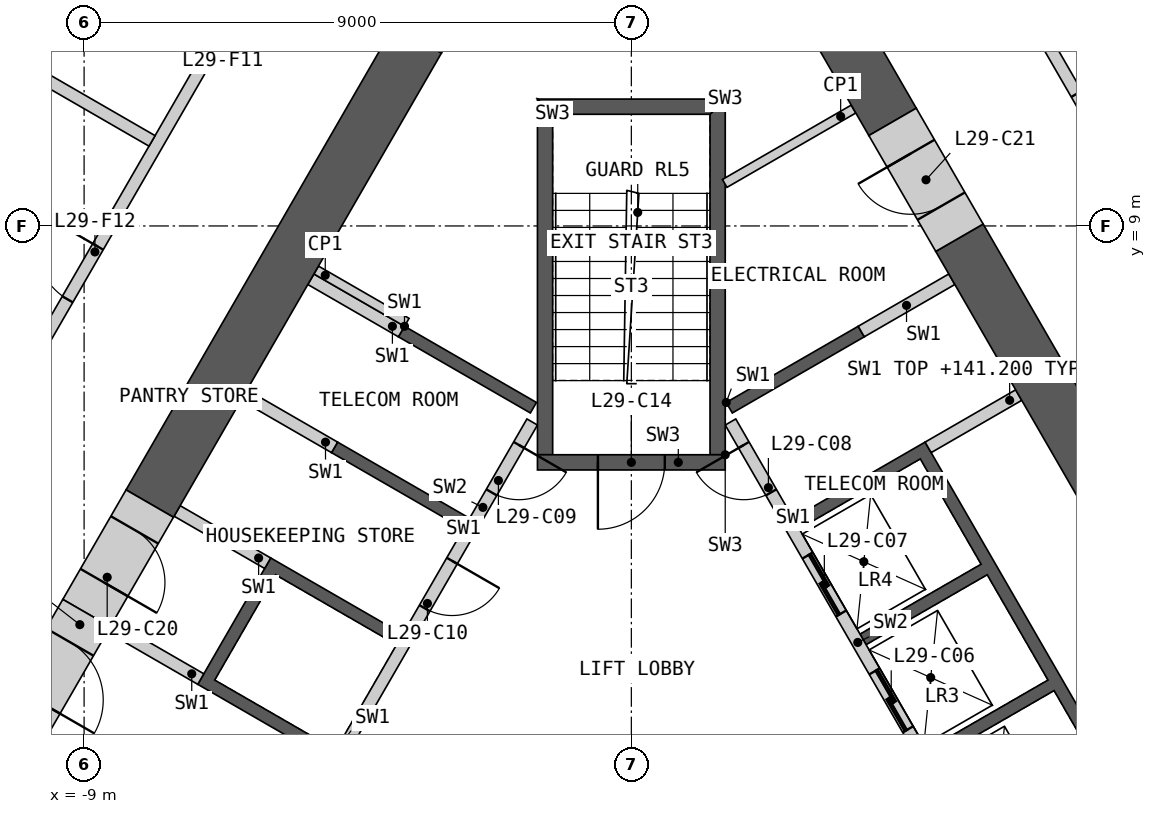
"""IFC4 building model, lengths in metres.
Left out: names, types, materials, properties, quantities, classifications, styles, units other than length and angle.
Written with IfcOpenShell. Run it as: python <this file> out.ifc"""

import sys

from ifc_helpers import new_model, si_unit, direction, frame, frame_2d, origin, place, context, subcontext, project, spatial, polyline, rectangle, outline, extrude, element, fill, save


model = new_model("IFC4")
c1 = context("Model", 3, precision=1e-05, world=origin(), true_north=direction((0.0, 1.0)))
c2 = subcontext(c1, "Body", "Model", "MODEL_VIEW")
j1 = project(units=[si_unit("LENGTHUNIT", "METRE"), si_unit("PLANEANGLEUNIT", "RADIAN")], contexts=[c1])
p1 = place(None, origin())
s1 = spatial("IfcSite", under=j1, at=p1, CompositionType="ELEMENT")
p2 = place(p1, origin())
s2 = spatial("IfcBuilding", under=s1, at=p2, CompositionType="ELEMENT")
p3 = place(p2, frame((0.0, 0.0, 137.4)))
s3 = spatial("IfcBuildingStorey", under=s2, at=p3, CompositionType="ELEMENT", Elevation=137.4)
p4 = place(p3, origin())
e1 = element("IfcWall", 1, at=p4, inside=s3, PredefinedType="SHEAR", context=c2, shape_type="SweptSolid", body=[
    extrude(outline(polyline([(1.561, 6.097), (3.731, 7.35), (3.831, 7.177), (1.66, 5.924), (1.561, 6.097)])), origin(), (0.0, 0.0, 1.0), 3.8),
])
p5 = place(p3, origin())
e2 = element("IfcWall", 2, at=p5, inside=s3, PredefinedType="SHEAR", context=c2, shape_type="SweptSolid", body=[
    extrude(outline(polyline([(2.66, 4.192), (4.831, 5.445), (8.231, -0.444), (6.061, -1.697), (5.96, -1.524), (7.952, -0.374), (6.952, 1.358), (4.96, 0.208), (4.861, 0.381), (6.852, 1.531), (5.852, 3.263), (3.861, 2.113), (3.76, 2.287), (5.752, 3.437), (4.752, 5.169), (2.76, 4.019), (2.66, 4.192)])), origin(), (0.0, 0.0, 1.0), 3.8),
])
p6 = place(p3, frame((5.817, -1.476, 0.0), z_axis=(0.0, 0.0, 1.0), x_axis=(-0.500002616675, 0.866023893041, 0.0)))
e3 = element("IfcWall", 3, at=p6, inside=s3, PredefinedType="SOLIDWALL", context=c2, shape_type="SweptSolid", body=[
    extrude(rectangle(XDim=8.373, YDim=0.2, at=frame_2d((4.187, 0.0))), origin(), (0.0, 0.0, 1.0), 3.8),
])
p7 = place(p6, frame((0.337, 0.0, 0.0)))
e4 = element("IfcOpeningElement", 4, at=p7, cuts=e3, PredefinedType="OPENING", context=c2, shape_type="SweptSolid", body=[
    extrude(rectangle(XDim=1.1, YDim=2.1, at=frame_2d((0.55, 1.05))), frame((0.0, 0.11, 0.0), z_axis=(0.0, -1.0, 0.0), x_axis=(1.0, 0.0, 0.0)), (0.0, 0.0, 1.0), 0.22),
])
p8 = place(p6, frame((2.537, 0.0, 0.0)))
e5 = element("IfcOpeningElement", 5, at=p8, cuts=e3, PredefinedType="OPENING", context=c2, shape_type="SweptSolid", body=[
    extrude(rectangle(XDim=1.1, YDim=2.1, at=frame_2d((0.55, 1.05))), frame((0.0, 0.11, 0.0), z_axis=(0.0, -1.0, 0.0), x_axis=(1.0, 0.0, 0.0)), (0.0, 0.0, 1.0), 0.22),
])
p9 = place(p6, frame((4.737, 0.0, 0.0)))
e6 = element("IfcOpeningElement", 6, at=p9, cuts=e3, PredefinedType="OPENING", context=c2, shape_type="SweptSolid", body=[
    extrude(rectangle(XDim=1.1, YDim=2.1, at=frame_2d((0.55, 1.05))), frame((0.0, 0.11, 0.0), z_axis=(0.0, -1.0, 0.0), x_axis=(1.0, 0.0, 0.0)), (0.0, 0.0, 1.0), 0.22),
])
p10 = place(p6, frame((7.037, 0.0, 0.0)))
e7 = element("IfcOpeningElement", 7, at=p10, cuts=e3, PredefinedType="OPENING", context=c2, shape_type="SweptSolid", body=[
    extrude(rectangle(XDim=0.9, YDim=2.1, at=frame_2d((0.45, 1.05))), frame((0.0, 0.11, 0.0), z_axis=(0.0, -1.0, 0.0), x_axis=(1.0, 0.0, 0.0)), (0.0, 0.0, 1.0), 0.22),
])
for number, where, z_axis, x_axis in (
    (8, (4.881, 5.358, 0.0), (0.0, 0.0, 1.0), (0.866, 0.5, 0.0)),
    (9, (3.781, 7.263, 0.0), (0.0, 0.0, 1.0), (0.866, 0.5, 0.0)),
):
    element("IfcWall", number, at=place(p3, frame(where, z_axis=z_axis, x_axis=x_axis)), inside=s3, PredefinedType="SHEAR", context=c2, shape_type="SweptSolid", body=[
        extrude(rectangle(XDim=1.72, YDim=0.2, at=frame_2d((0.86, 0.0))), origin(), (0.0, 0.0, 1.0), 3.8),
    ])
p11 = place(p3, origin())
e10 = element("IfcWall", 10, at=p11, inside=s3, PredefinedType="SHEAR", context=c2, shape_type="SweptSolid", body=[
    extrude(outline(polyline([(-4.96, 0.208), (-7.131, 1.461), (-5.931, 3.54), (-3.76, 2.287), (-3.861, 2.113), (-5.852, 3.263), (-6.852, 1.531), (-4.861, 0.381), (-4.96, 0.208)])), origin(), (0.0, 0.0, 1.0), 3.8),
])
p12 = place(p3, origin())
e11 = element("IfcWall", 11, at=p12, inside=s3, PredefinedType="SHEAR", context=c2, shape_type="SweptSolid", body=[
    extrude(outline(polyline([(-2.76, 4.019), (-4.931, 5.272), (-4.831, 5.445), (-2.66, 4.192), (-2.76, 4.019)])), origin(), (0.0, 0.0, 1.0), 3.8),
])
p13 = place(p3, origin())
e12 = element("IfcWall", 12, at=p13, inside=s3, PredefinedType="SHEAR", context=c2, shape_type="SweptSolid", body=[
    extrude(outline(polyline([(-3.731, 7.35), (-1.561, 6.097), (-1.66, 5.924), (-3.831, 7.177), (-3.731, 7.35)])), origin(), (0.0, 0.0, 1.0), 3.8),
])
p14 = place(p3, frame((-1.631, 5.776, 0.0), z_axis=(0.0, 0.0, 1.0), x_axis=(-0.499992876559, -0.866029516466, 0.0)))
e13 = element("IfcWall", 13, at=p14, inside=s3, PredefinedType="SOLIDWALL", context=c2, shape_type="SweptSolid", body=[
    extrude(rectangle(XDim=6.486, YDim=0.2, at=frame_2d((3.243, 0.0))), origin(), (0.0, 0.0, 1.0), 3.8),
])
p15 = place(p14, frame((0.437, 0.0, 0.0)))
e14 = element("IfcOpeningElement", 14, at=p15, cuts=e13, PredefinedType="OPENING", context=c2, shape_type="SweptSolid", body=[
    extrude(rectangle(XDim=0.9, YDim=2.1, at=frame_2d((0.45, 1.05))), frame((0.0, 0.11, 0.0), z_axis=(0.0, -1.0, 0.0), x_axis=(1.0, 0.0, 0.0)), (0.0, 0.0, 1.0), 0.22),
])
p16 = place(p14, frame((2.637, 0.0, 0.0)))
e15 = element("IfcOpeningElement", 15, at=p16, cuts=e13, PredefinedType="OPENING", context=c2, shape_type="SweptSolid", body=[
    extrude(rectangle(XDim=0.9, YDim=2.1, at=frame_2d((0.45, 1.05))), frame((0.0, 0.11, 0.0), z_axis=(0.0, -1.0, 0.0), x_axis=(1.0, 0.0, 0.0)), (0.0, 0.0, 1.0), 0.22),
])
for number, where, z_axis, x_axis in (
    (16, (-3.781, 7.263, 0.0), (0.0, 0.0, 1.0), (-0.866, 0.5, 0.0)),
    (17, (-4.881, 5.358, 0.0), (0.0, 0.0, 1.0), (-0.866, 0.5, 0.0)),
):
    element("IfcWall", number, at=place(p3, frame(where, z_axis=z_axis, x_axis=x_axis)), inside=s3, PredefinedType="SHEAR", context=c2, shape_type="SweptSolid", body=[
        extrude(rectangle(XDim=1.72, YDim=0.2, at=frame_2d((0.86, 0.0))), origin(), (0.0, 0.0, 1.0), 3.8),
    ])
p17 = place(p3, frame((-5.981, 3.453, 0.0), z_axis=(0.0, 0.0, 1.0), x_axis=(-0.866060346521, 0.499939472521, 0.0)))
e18 = element("IfcWall", 18, at=p17, inside=s3, PredefinedType="SHEAR", context=c2, shape_type="SweptSolid", body=[
    extrude(rectangle(XDim=1.72, YDim=0.2, at=frame_2d((0.86, 0.0))), origin(), (0.0, 0.0, 1.0), 3.8),
])
p18 = place(p3, frame((-7.081, 1.548, 0.0), z_axis=(0.0, 0.0, 1.0), x_axis=(-0.865963414263, 0.500107353632, 0.0)))
e19 = element("IfcWall", 19, at=p18, inside=s3, PredefinedType="SHEAR", context=c2, shape_type="SweptSolid", body=[
    extrude(rectangle(XDim=1.72, YDim=0.2, at=frame_2d((0.86, 0.0))), origin(), (0.0, 0.0, 1.0), 3.8),
])
p19 = place(p3, origin())
e20 = element("IfcWall", 20, at=p19, inside=s3, PredefinedType="SHEAR", context=c2, shape_type="SweptSolid", body=[
    extrude(outline(polyline([(1.544, 5.237), (1.544, 11.087), (1.294, 10.837), (1.294, 5.237), (1.544, 5.237)])), origin(), (0.0, 0.0, 1.0), 3.8),
])
p20 = place(p3, origin())
e21 = element("IfcWall", 21, at=p20, inside=s3, PredefinedType="SHEAR", context=c2, shape_type="SweptSolid", body=[
    extrude(outline(polyline([(1.544, 11.087), (-1.544, 11.087), (-1.294, 10.837), (1.294, 10.837), (1.544, 11.087)])), origin(), (0.0, 0.0, 1.0), 3.8),
])
p21 = place(p3, origin())
e22 = element("IfcWall", 22, at=p21, inside=s3, PredefinedType="SHEAR", context=c2, shape_type="SweptSolid", body=[
    extrude(outline(polyline([(-1.294, 10.837), (-1.544, 11.087), (-1.544, 5.237), (-1.294, 5.237), (-1.294, 10.837)])), origin(), (0.0, 0.0, 1.0), 3.8),
])
p22 = place(p3, frame((1.544, 5.112, 0.0), z_axis=(0.0, 0.0, 1.0), x_axis=(-1.0, 0.0, 0.0)))
e23 = element("IfcWall", 23, at=p22, inside=s3, PredefinedType="SHEAR", context=c2, shape_type="SweptSolid", body=[
    extrude(rectangle(XDim=3.088, YDim=0.25, at=frame_2d((1.544, 0.0))), origin(), (0.0, 0.0, 1.0), 3.8),
])
p23 = place(p22, frame((0.994, 0.0, 0.0)))
e24 = element("IfcOpeningElement", 24, at=p23, cuts=e23, PredefinedType="OPENING", context=c2, shape_type="SweptSolid", body=[
    extrude(rectangle(XDim=1.1, YDim=2.1, at=frame_2d((0.55, 1.05))), frame((0.0, 0.135, 0.0), z_axis=(0.0, -1.0, 0.0), x_axis=(1.0, 0.0, 0.0)), (0.0, 0.0, 1.0), 0.27),
])
p24 = place(p3, frame((-3.693, 7.415, 0.0), z_axis=(0.0, 0.0, 1.0), x_axis=(-0.866024871741, 0.500000921525, 0.0)))
e25 = element("IfcWall", 25, at=p24, inside=s3, PredefinedType="PARTITIONING", context=c2, shape_type="SweptSolid", body=[
    extrude(rectangle(XDim=1.72, YDim=0.15, at=frame_2d((0.86, 0.0))), origin(), (0.0, 0.0, 1.0), 3.8),
])
p25 = place(p3, frame((3.654, 10.923, 0.0), z_axis=(0.0, 0.0, 1.0), x_axis=(-0.865974546186, -0.5000880776, 0.0)))
e26 = element("IfcWall", 26, at=p25, inside=s3, PredefinedType="PARTITIONING", context=c2, shape_type="SweptSolid", body=[
    extrude(rectangle(XDim=2.447, YDim=0.15, at=frame_2d((1.223, 0.0))), origin(), (0.0, 0.0, 1.0), 3.8),
])
p26 = place(p3, frame((10.521, -0.07, 0.0), z_axis=(0.0, 0.0, 1.0), x_axis=(-0.499997384719, 0.866026913713, 0.0)))
e27 = element("IfcWall", 27, at=p26, inside=s3, PredefinedType="SHEAR", context=c2, shape_type="SweptSolid", body=[
    extrude(rectangle(XDim=10.249, YDim=0.9, at=frame_2d((5.125, 0.0))), origin(), (0.0, 0.0, 1.0), 3.8),
])
p27 = place(p3, frame((4.296, 10.712, 0.0), z_axis=(0.0, 0.0, 1.0), x_axis=(-0.500011000363, 0.866019052629, 0.0)))
e28 = element("IfcWall", 28, at=p27, inside=s3, PredefinedType="SHEAR", context=c2, shape_type="SweptSolid", body=[
    extrude(rectangle(XDim=7.812, YDim=0.9, at=frame_2d((3.906, 0.0))), origin(), (0.0, 0.0, 1.0), 3.8),
])
p28 = place(p3, frame((-3.512, 12.069, 0.0), z_axis=(0.0, 0.0, 1.0), x_axis=(-0.500002126466, -0.866024176065, 0.0)))
e29 = element("IfcWall", 29, at=p28, inside=s3, PredefinedType="SHEAR", context=c2, shape_type="SweptSolid", body=[
    extrude(rectangle(XDim=8.816, YDim=0.9, at=frame_2d((4.408, 0.0))), origin(), (0.0, 0.0, 1.0), 3.8),
])
p29 = place(p3, frame((-7.92, 4.434, 0.0), z_axis=(0.0, 0.0, 1.0), x_axis=(-0.499939227269, -0.866060488094, 0.0)))
e30 = element("IfcWall", 30, at=p29, inside=s3, PredefinedType="SHEAR", context=c2, shape_type="SweptSolid", body=[
    extrude(rectangle(XDim=2.08, YDim=0.9, at=frame_2d((1.04, 0.0))), origin(), (0.0, 0.0, 1.0), 3.8),
])
p30 = place(p29, frame((0.5, 0.0, 0.0)))
e31 = element("IfcOpeningElement", 31, at=p30, cuts=e30, PredefinedType="OPENING", context=c2, shape_type="SweptSolid", body=[
    extrude(rectangle(XDim=1.0, YDim=2.1, at=frame_2d((0.5, 1.05))), frame((0.0, 0.46, 0.0), z_axis=(0.0, -1.0, 0.0), x_axis=(1.0, 0.0, 0.0)), (0.0, 0.0, 1.0), 0.92),
])
p31 = place(p3, frame((5.396, 8.806, 0.0), z_axis=(0.0, 0.0, 1.0), x_axis=(-0.499981787252, 0.866035918664, 0.0)))
e32 = element("IfcWall", 32, at=p31, inside=s3, PredefinedType="SHEAR", context=c2, shape_type="SweptSolid", body=[
    extrude(rectangle(XDim=2.2, YDim=0.9, at=frame_2d((1.1, 0.0))), origin(), (0.0, 0.0, 1.0), 3.8),
])
p32 = place(p31, frame((0.6, 0.0, 0.0)))
e33 = element("IfcOpeningElement", 33, at=p32, cuts=e32, PredefinedType="OPENING", context=c2, shape_type="SweptSolid", body=[
    extrude(rectangle(XDim=1.0, YDim=2.1, at=frame_2d((0.5, 1.05))), frame((0.0, 0.46, 0.0), z_axis=(0.0, -1.0, 0.0), x_axis=(1.0, 0.0, 0.0)), (0.0, 0.0, 1.0), 0.92),
])
p33 = place(p3, frame((-2.413, 13.974, 0.0), z_axis=(0.0, 0.0, 1.0), x_axis=(-0.499946605688, -0.86605622881, 0.0)))
e34 = element("IfcWall", 34, at=p33, inside=s3, PredefinedType="SHEAR", context=c2, shape_type="SweptSolid", body=[
    extrude(rectangle(XDim=2.2, YDim=0.9, at=frame_2d((1.1, 0.0))), origin(), (0.0, 0.0, 1.0), 3.8),
])
p34 = place(p33, frame((0.6, 0.0, 0.0)))
e35 = element("IfcOpeningElement", 35, at=p34, cuts=e34, PredefinedType="OPENING", context=c2, shape_type="SweptSolid", body=[
    extrude(rectangle(XDim=1.0, YDim=2.1, at=frame_2d((0.5, 1.05))), frame((0.0, 0.46, 0.0), z_axis=(0.0, -1.0, 0.0), x_axis=(1.0, 0.0, 0.0)), (0.0, 0.0, 1.0), 0.92),
])
p35 = place(p3, frame((-8.96, 2.633, 0.0), z_axis=(0.0, 0.0, 1.0), x_axis=(-0.50002983664, -0.866008176907, 0.0)))
e36 = element("IfcWall", 36, at=p35, inside=s3, PredefinedType="SHEAR", context=c2, shape_type="SweptSolid", body=[
    extrude(rectangle(XDim=2.2, YDim=0.9, at=frame_2d((1.1, 0.0))), origin(), (0.0, 0.0, 1.0), 3.8),
])
p36 = place(p35, frame((0.55, 0.0, 0.0)))
e37 = element("IfcOpeningElement", 37, at=p36, cuts=e36, PredefinedType="OPENING", context=c2, shape_type="SweptSolid", body=[
    extrude(rectangle(XDim=1.1, YDim=2.1, at=frame_2d((0.55, 1.05))), frame((0.0, 0.46, 0.0), z_axis=(0.0, -1.0, 0.0), x_axis=(1.0, 0.0, 0.0)), (0.0, 0.0, 1.0), 0.92),
])
p37 = place(p3, frame((5.295, 14.68, 0.0), z_axis=(0.0, 0.0, 1.0), x_axis=(0.500012035596, -0.866018454918, 0.0)))
e38 = element("IfcWall", 38, at=p37, inside=s3, PredefinedType="PARTITIONING", context=c2, shape_type="SweptSolid", body=[
    extrude(rectangle(XDim=9.803, YDim=0.2, at=frame_2d((4.902, 0.0))), origin(), (0.0, 0.0, 1.0), 3.8),
])
p38 = place(p37, frame((4.052, 0.0, 0.0)))
e39 = element("IfcOpeningElement", 39, at=p38, cuts=e38, PredefinedType="OPENING", context=c2, shape_type="SweptSolid", body=[
    extrude(rectangle(XDim=1.8, YDim=2.1, at=frame_2d((0.9, 1.05))), frame((0.0, 0.11, 0.0), z_axis=(0.0, -1.0, 0.0), x_axis=(1.0, 0.0, 0.0)), (0.0, 0.0, 1.0), 0.22),
])
p39 = place(p3, frame((-10.197, 6.19, 0.0), z_axis=(0.0, 0.0, 1.0), x_axis=(0.500012035596, 0.866018454918, 0.0)))
e40 = element("IfcWall", 40, at=p39, inside=s3, PredefinedType="PARTITIONING", context=c2, shape_type="SweptSolid", body=[
    extrude(rectangle(XDim=9.803, YDim=0.2, at=frame_2d((4.902, 0.0))), origin(), (0.0, 0.0, 1.0), 3.8),
])
p40 = place(p39, frame((6.853, 0.0, 0.0)))
e41 = element("IfcOpeningElement", 41, at=p40, cuts=e40, PredefinedType="OPENING", context=c2, shape_type="SweptSolid", body=[
    extrude(rectangle(XDim=1.0, YDim=2.1, at=frame_2d((0.5, 1.05))), frame((0.0, 0.11, 0.0), z_axis=(0.0, -1.0, 0.0), x_axis=(1.0, 0.0, 0.0)), (0.0, 0.0, 1.0), 0.22),
])
p41 = place(p39, frame((1.851, 0.0, 0.0)))
e42 = element("IfcOpeningElement", 42, at=p41, cuts=e40, PredefinedType="OPENING", context=c2, shape_type="SweptSolid", body=[
    extrude(rectangle(XDim=1.0, YDim=2.1, at=frame_2d((0.5, 1.05))), frame((0.0, 0.11, 0.0), z_axis=(0.0, -1.0, 0.0), x_axis=(1.0, 0.0, 0.0)), (0.0, 0.0, 1.0), 0.22),
])
p42 = place(p3, frame((-15.01, 14.514, 0.0), z_axis=(0.0, 0.0, 1.0), x_axis=(0.866018103232, -0.500012644715, 0.0)))
e43 = element("IfcWall", 43, at=p42, inside=s3, PredefinedType="PARTITIONING", context=c2, shape_type="SweptSolid", body=[
    extrude(rectangle(XDim=8.229, YDim=0.2, at=frame_2d((4.115, 0.0))), origin(), (0.0, 0.0, 1.0), 2.885),
])
p43 = place(p8, origin())
e44 = element("IfcDoor", 44, at=p43, inside=s3, OperationType="SLIDING_TO_LEFT", PredefinedType="DOOR", context=c2, shape_type="SweptSolid", body=[
    extrude(rectangle(XDim=1.1, YDim=2.1, at=frame_2d((0.55, 1.05))), frame((0.0, 0.025, 0.0), z_axis=(0.0, -1.0, 0.0), x_axis=(1.0, 0.0, 0.0)), (0.0, 0.0, 1.0), 0.05),
])
fill(e5, e44)
p44 = place(p9, origin())
e45 = element("IfcDoor", 45, at=p44, inside=s3, OperationType="SLIDING_TO_LEFT", PredefinedType="DOOR", context=c2, shape_type="SweptSolid", body=[
    extrude(rectangle(XDim=1.1, YDim=2.1, at=frame_2d((0.55, 1.05))), frame((0.0, 0.025, 0.0), z_axis=(0.0, -1.0, 0.0), x_axis=(1.0, 0.0, 0.0)), (0.0, 0.0, 1.0), 0.05),
])
fill(e6, e45)
p45 = place(p10, origin())
e46 = element("IfcDoor", 46, at=p45, inside=s3, OperationType="SINGLE_SWING_RIGHT", PredefinedType="DOOR", context=c2, shape_type="SweptSolid", body=[
    extrude(rectangle(XDim=0.9, YDim=2.1, at=frame_2d((0.45, 1.05))), frame((0.0, 0.025, 0.0), z_axis=(0.0, -1.0, 0.0), x_axis=(1.0, 0.0, 0.0)), (0.0, 0.0, 1.0), 0.05),
])
fill(e7, e46)
p46 = place(p15, origin())
e47 = element("IfcDoor", 47, at=p46, inside=s3, OperationType="SINGLE_SWING_LEFT", PredefinedType="DOOR", context=c2, shape_type="SweptSolid", body=[
    extrude(rectangle(XDim=0.9, YDim=2.1, at=frame_2d((0.45, 1.05))), frame((0.0, 0.025, 0.0), z_axis=(0.0, -1.0, 0.0), x_axis=(1.0, 0.0, 0.0)), (0.0, 0.0, 1.0), 0.05),
])
fill(e14, e47)
p47 = place(p16, origin())
e48 = element("IfcDoor", 48, at=p47, inside=s3, OperationType="SINGLE_SWING_LEFT", PredefinedType="DOOR", context=c2, shape_type="SweptSolid", body=[
    extrude(rectangle(XDim=0.9, YDim=2.1, at=frame_2d((0.45, 1.05))), frame((0.0, 0.025, 0.0), z_axis=(0.0, -1.0, 0.0), x_axis=(1.0, 0.0, 0.0)), (0.0, 0.0, 1.0), 0.05),
])
fill(e15, e48)
p48 = place(p23, origin())
e49 = element("IfcDoor", 49, at=p48, inside=s3, OperationType="SINGLE_SWING_RIGHT", PredefinedType="DOOR", context=c2, shape_type="SweptSolid", body=[
    extrude(rectangle(XDim=1.1, YDim=2.1, at=frame_2d((0.55, 1.05))), frame((0.0, 0.025, 0.0), z_axis=(0.0, -1.0, 0.0), x_axis=(1.0, 0.0, 0.0)), (0.0, 0.0, 1.0), 0.05),
])
fill(e24, e49)
p49 = place(p30, origin())
e50 = element("IfcDoor", 50, at=p49, inside=s3, OperationType="SINGLE_SWING_RIGHT", PredefinedType="DOOR", context=c2, shape_type="SweptSolid", body=[
    extrude(rectangle(XDim=1.0, YDim=2.1, at=frame_2d((0.5, 1.05))), frame((0.0, 0.205, 0.0), z_axis=(0.0, -1.0, 0.0), x_axis=(1.0, 0.0, 0.0)), (0.0, 0.0, 1.0), 0.05),
])
fill(e31, e50)
p50 = place(p32, origin())
e51 = element("IfcDoor", 51, at=p50, inside=s3, OperationType="SINGLE_SWING_RIGHT", PredefinedType="DOOR", context=c2, shape_type="SweptSolid", body=[
    extrude(rectangle(XDim=1.0, YDim=2.1, at=frame_2d((0.5, 1.05))), frame((0.0, 0.205, 0.0), z_axis=(0.0, -1.0, 0.0), x_axis=(1.0, 0.0, 0.0)), (0.0, 0.0, 1.0), 0.05),
])
fill(e33, e51)
p51 = place(p36, origin())
e52 = element("IfcDoor", 52, at=p51, inside=s3, OperationType="SINGLE_SWING_RIGHT", PredefinedType="DOOR", context=c2, shape_type="SweptSolid", body=[
    extrude(rectangle(XDim=1.1, YDim=2.1, at=frame_2d((0.55, 1.05))), frame((0.0, 0.205, 0.0), z_axis=(0.0, -1.0, 0.0), x_axis=(1.0, 0.0, 0.0)), (0.0, 0.0, 1.0), 0.05),
])
fill(e37, e52)
p52 = place(p38, origin())
e53 = element("IfcDoor", 53, at=p52, inside=s3, OperationType="DOUBLE_DOOR_SINGLE_SWING", PredefinedType="DOOR", context=c2, shape_type="SweptSolid", body=[
    extrude(rectangle(XDim=1.8, YDim=2.1, at=frame_2d((0.9, 1.05))), frame((0.0, 0.025, 0.0), z_axis=(0.0, -1.0, 0.0), x_axis=(1.0, 0.0, 0.0)), (0.0, 0.0, 1.0), 0.05),
])
fill(e39, e53)
p53 = place(p41, origin())
e54 = element("IfcDoor", 54, at=p53, inside=s3, OperationType="SINGLE_SWING_RIGHT", PredefinedType="DOOR", context=c2, shape_type="SweptSolid", body=[
    extrude(rectangle(XDim=1.0, YDim=2.1, at=frame_2d((0.5, 1.05))), frame((0.0, 0.025, 0.0), z_axis=(0.0, -1.0, 0.0), x_axis=(1.0, 0.0, 0.0)), (0.0, 0.0, 1.0), 0.05),
])
fill(e42, e54)
save(model, sys.argv[1])
